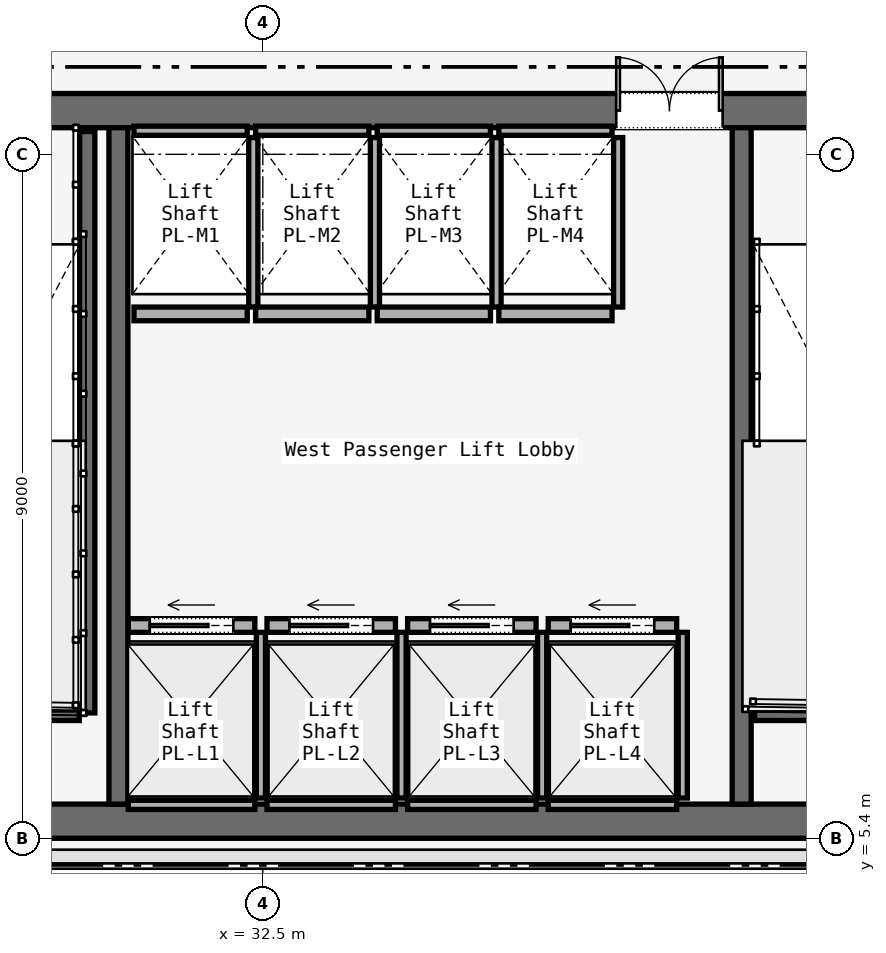
"""IFC4 building model, lengths in metres.
Left out: names, types, materials, properties, quantities, classifications, styles, units other than length and angle.
Written with IfcOpenShell. Run it as: python <this file> out.ifc"""

import sys

from ifc_helpers import new_model, si_unit, direction, frame, frame_2d, origin, place, context, subcontext, project, spatial, rectangle, extrude, element, fill, save


model = new_model("IFC4")
c1 = context("Model", 3, precision=1e-05, world=origin(), true_north=direction((0.0, 1.0)))
c2 = subcontext(c1, "Body", "Model", "MODEL_VIEW")
j1 = project(units=[si_unit("LENGTHUNIT", "METRE"), si_unit("PLANEANGLEUNIT", "RADIAN")], contexts=[c1])
p1 = place(None, origin())
s1 = spatial("IfcSite", under=j1, at=p1, CompositionType="ELEMENT")
p2 = place(p1, origin())
s2 = spatial("IfcBuilding", under=s1, at=p2, CompositionType="ELEMENT")
p3 = place(p2, frame((0.0, 0.0, 58.8)))
s3 = spatial("IfcBuildingStorey", under=s2, at=p3, CompositionType="ELEMENT", Elevation=58.8)
p4 = place(p3, frame((26.45, 14.975, 0.0), z_axis=(0.0, 0.0, 1.0), x_axis=(1.0, 0.0, 0.0)))
e1 = element("IfcWall", 1, at=p4, inside=s3, PredefinedType="SOLIDWALL", context=c2, shape_type="SweptSolid", body=[
    extrude(rectangle(XDim=31.1, YDim=0.45, at=frame_2d((15.55, 0.0))), origin(), (0.0, 0.0, 1.0), 3.58),
])
p5 = place(p4, frame((1.65, 0.0, 0.0)))
e2 = element("IfcOpeningElement", 2, at=p5, cuts=e1, PredefinedType="OPENING", context=c2, shape_type="SweptSolid", body=[
    extrude(rectangle(XDim=1.1, YDim=2.2, at=frame_2d((0.55, 1.1))), frame((0.0, 0.225, 0.0), z_axis=(0.0, -1.0, 0.0), x_axis=(1.0, 0.0, 0.0)), (0.0, 0.0, 1.0), 0.45),
])
p6 = place(p4, frame((13.65, 0.0, 0.0)))
e3 = element("IfcOpeningElement", 3, at=p6, cuts=e1, PredefinedType="OPENING", context=c2, shape_type="SweptSolid", body=[
    extrude(rectangle(XDim=1.1, YDim=2.2, at=frame_2d((0.55, 1.1))), frame((0.0, 0.225, 0.0), z_axis=(0.0, -1.0, 0.0), x_axis=(1.0, 0.0, 0.0)), (0.0, 0.0, 1.0), 0.45),
])
p7 = place(p4, frame((25.55, 0.0, 0.0)))
e4 = element("IfcOpeningElement", 4, at=p7, cuts=e1, PredefinedType="OPENING", context=c2, shape_type="SweptSolid", body=[
    extrude(rectangle(XDim=1.1, YDim=2.2, at=frame_2d((0.55, 1.1))), frame((0.0, 0.225, 0.0), z_axis=(0.0, -1.0, 0.0), x_axis=(1.0, 0.0, 0.0)), (0.0, 0.0, 1.0), 0.45),
])
p8 = place(p4, frame((10.7, 0.0, 0.0)))
e5 = element("IfcOpeningElement", 5, at=p8, cuts=e1, PredefinedType="OPENING", context=c2, shape_type="SweptSolid", body=[
    extrude(rectangle(XDim=1.4, YDim=2.2, at=frame_2d((0.7, 1.1))), frame((0.0, 0.225, 0.0), z_axis=(0.0, -1.0, 0.0), x_axis=(1.0, 0.0, 0.0)), (0.0, 0.0, 1.0), 0.45),
])
p9 = place(p4, frame((19.35, 0.0, 0.0)))
e6 = element("IfcOpeningElement", 6, at=p9, cuts=e1, PredefinedType="OPENING", context=c2, shape_type="SweptSolid", body=[
    extrude(rectangle(XDim=1.1, YDim=2.2, at=frame_2d((0.55, 1.1))), frame((0.0, 0.225, 0.0), z_axis=(0.0, -1.0, 0.0), x_axis=(1.0, 0.0, 0.0)), (0.0, 0.0, 1.0), 0.45),
])
p10 = place(p4, frame((21.4, 0.0, 0.0)))
e7 = element("IfcOpeningElement", 7, at=p10, cuts=e1, PredefinedType="OPENING", context=c2, shape_type="SweptSolid", body=[
    extrude(rectangle(XDim=0.9, YDim=2.1, at=frame_2d((0.45, 1.05))), frame((0.0, 0.225, 0.0), z_axis=(0.0, -1.0, 0.0), x_axis=(1.0, 0.0, 0.0)), (0.0, 0.0, 1.0), 0.45),
])
p11 = place(p4, frame((23.35, 0.0, 0.0)))
e8 = element("IfcOpeningElement", 8, at=p11, cuts=e1, PredefinedType="OPENING", context=c2, shape_type="SweptSolid", body=[
    extrude(rectangle(XDim=1.3, YDim=2.3, at=frame_2d((0.65, 1.15))), frame((0.0, 0.225, 0.0), z_axis=(0.0, -1.0, 0.0), x_axis=(1.0, 0.0, 0.0)), (0.0, 0.0, 1.0), 0.45),
])
p12 = place(p3, frame((26.45, 5.625, 0.0), z_axis=(0.0, 0.0, 1.0), x_axis=(1.0, 0.0, 0.0)))
e9 = element("IfcWall", 9, at=p12, inside=s3, PredefinedType="SOLIDWALL", context=c2, shape_type="SweptSolid", body=[
    extrude(rectangle(XDim=31.1, YDim=0.45, at=frame_2d((15.55, 0.0))), origin(), (0.0, 0.0, 1.0), 3.58),
])
for number, where, z_axis, x_axis in (
    (10, (30.6, 5.85, 0.0), (0.0, 0.0, 1.0), (0.0, 1.0, 0.0)),
    (11, (38.8, 5.85, 0.0), (0.0, 0.0, 1.0), (0.0, 1.0, 0.0)),
):
    element("IfcWall", number, at=place(p3, frame(where, z_axis=z_axis, x_axis=x_axis)), inside=s3, PredefinedType="SOLIDWALL", context=c2, shape_type="SweptSolid", body=[
        extrude(rectangle(XDim=8.9, YDim=0.25, at=frame_2d((4.45, 0.0))), origin(), (0.0, 0.0, 1.0), 3.58),
    ])
p13 = place(p3, frame((30.19, 14.7, 0.0), z_axis=(0.0, 0.0, 1.0), x_axis=(0.0, -1.0, 0.0)))
e12 = element("IfcWall", 12, at=p13, inside=s3, PredefinedType="SOLIDWALL", context=c2, shape_type="SweptSolid", body=[
    extrude(rectangle(XDim=7.65, YDim=0.2, at=frame_2d((3.825, 0.0))), origin(), (0.0, 0.0, 1.0), 3.8),
])
for number, where, z_axis, x_axis in (
    (13, (26.97, 7.05, 0.0), (0.0, 0.0, 1.0), (1.0, 0.0, 0.0)),
    (14, (38.97, 7.05, 0.0), (0.0, 0.0, 1.0), (1.0, 0.0, 0.0)),
):
    element("IfcWall", number, at=place(p3, frame(where, z_axis=z_axis, x_axis=x_axis)), inside=s3, PredefinedType="SOLIDWALL", context=c2, shape_type="SweptSolid", body=[
        extrude(rectangle(XDim=3.115, YDim=0.2, at=frame_2d((1.558, 0.0))), origin(), (0.0, 0.0, 1.0), 3.8),
    ])
p14 = place(p3, frame((30.73, 8.2, 0.0), z_axis=(0.0, 0.0, 1.0), x_axis=(1.0, 0.0, 0.0)))
e15 = element("IfcWall", 15, at=p14, inside=s3, PredefinedType="SOLIDWALL", context=c2, shape_type="SweptSolid", body=[
    extrude(rectangle(XDim=1.665, YDim=0.18, at=frame_2d((0.833, 0.0))), origin(), (0.0, 0.0, 1.0), 2.933),
])
p15 = place(p14, frame((0.282, 0.0, 0.0)))
e16 = element("IfcOpeningElement", 16, at=p15, cuts=e15, PredefinedType="OPENING", context=c2, shape_type="SweptSolid", body=[
    extrude(rectangle(XDim=1.1, YDim=2.2, at=frame_2d((0.55, 1.1))), frame((0.0, 0.09, 0.0), z_axis=(0.0, -1.0, 0.0), x_axis=(1.0, 0.0, 0.0)), (0.0, 0.0, 1.0), 0.18),
])
p16 = place(p3, frame((30.73, 5.84, 0.0), z_axis=(0.0, 0.0, 1.0), x_axis=(1.0, 0.0, 0.0)))
e17 = element("IfcWall", 17, at=p16, inside=s3, PredefinedType="SOLIDWALL", context=c2, shape_type="SweptSolid", body=[
    extrude(rectangle(XDim=1.665, YDim=0.12, at=frame_2d((0.833, 0.0))), origin(), (0.0, 0.0, 1.0), 2.933),
])
p17 = place(p3, frame((32.475, 5.93, 0.0), z_axis=(0.0, 0.0, 1.0), x_axis=(0.0, 1.0, 0.0)))
e18 = element("IfcWall", 18, at=p17, inside=s3, PredefinedType="SOLIDWALL", context=c2, shape_type="SweptSolid", body=[
    extrude(rectangle(XDim=2.18, YDim=0.12, at=frame_2d((1.09, 0.0))), origin(), (0.0, 0.0, 1.0), 2.933),
])
p18 = place(p3, frame((32.555, 8.2, 0.0), z_axis=(0.0, 0.0, 1.0), x_axis=(1.0, 0.0, 0.0)))
e19 = element("IfcWall", 19, at=p18, inside=s3, PredefinedType="SOLIDWALL", context=c2, shape_type="SweptSolid", body=[
    extrude(rectangle(XDim=1.69, YDim=0.18, at=frame_2d((0.845, 0.0))), origin(), (0.0, 0.0, 1.0), 2.933),
])
p19 = place(p18, frame((0.295, 0.0, 0.0)))
e20 = element("IfcOpeningElement", 20, at=p19, cuts=e19, PredefinedType="OPENING", context=c2, shape_type="SweptSolid", body=[
    extrude(rectangle(XDim=1.1, YDim=2.2, at=frame_2d((0.55, 1.1))), frame((0.0, 0.09, 0.0), z_axis=(0.0, -1.0, 0.0), x_axis=(1.0, 0.0, 0.0)), (0.0, 0.0, 1.0), 0.18),
])
p20 = place(p3, frame((32.555, 5.84, 0.0), z_axis=(0.0, 0.0, 1.0), x_axis=(1.0, 0.0, 0.0)))
e21 = element("IfcWall", 21, at=p20, inside=s3, PredefinedType="SOLIDWALL", context=c2, shape_type="SweptSolid", body=[
    extrude(rectangle(XDim=1.69, YDim=0.12, at=frame_2d((0.845, 0.0))), origin(), (0.0, 0.0, 1.0), 2.933),
])
p21 = place(p3, frame((34.325, 5.93, 0.0), z_axis=(0.0, 0.0, 1.0), x_axis=(0.0, 1.0, 0.0)))
e22 = element("IfcWall", 22, at=p21, inside=s3, PredefinedType="SOLIDWALL", context=c2, shape_type="SweptSolid", body=[
    extrude(rectangle(XDim=2.18, YDim=0.12, at=frame_2d((1.09, 0.0))), origin(), (0.0, 0.0, 1.0), 2.933),
])
p22 = place(p3, frame((34.405, 8.2, 0.0), z_axis=(0.0, 0.0, 1.0), x_axis=(1.0, 0.0, 0.0)))
e23 = element("IfcWall", 23, at=p22, inside=s3, PredefinedType="SOLIDWALL", context=c2, shape_type="SweptSolid", body=[
    extrude(rectangle(XDim=1.69, YDim=0.18, at=frame_2d((0.845, 0.0))), origin(), (0.0, 0.0, 1.0), 2.933),
])
p23 = place(p22, frame((0.295, 0.0, 0.0)))
e24 = element("IfcOpeningElement", 24, at=p23, cuts=e23, PredefinedType="OPENING", context=c2, shape_type="SweptSolid", body=[
    extrude(rectangle(XDim=1.1, YDim=2.2, at=frame_2d((0.55, 1.1))), frame((0.0, 0.09, 0.0), z_axis=(0.0, -1.0, 0.0), x_axis=(1.0, 0.0, 0.0)), (0.0, 0.0, 1.0), 0.18),
])
p24 = place(p3, frame((34.405, 5.84, 0.0), z_axis=(0.0, 0.0, 1.0), x_axis=(1.0, 0.0, 0.0)))
e25 = element("IfcWall", 25, at=p24, inside=s3, PredefinedType="SOLIDWALL", context=c2, shape_type="SweptSolid", body=[
    extrude(rectangle(XDim=1.69, YDim=0.12, at=frame_2d((0.845, 0.0))), origin(), (0.0, 0.0, 1.0), 2.933),
])
p25 = place(p3, frame((36.175, 5.93, 0.0), z_axis=(0.0, 0.0, 1.0), x_axis=(0.0, 1.0, 0.0)))
e26 = element("IfcWall", 26, at=p25, inside=s3, PredefinedType="SOLIDWALL", context=c2, shape_type="SweptSolid", body=[
    extrude(rectangle(XDim=2.18, YDim=0.12, at=frame_2d((1.09, 0.0))), origin(), (0.0, 0.0, 1.0), 2.933),
])
p26 = place(p3, frame((36.255, 8.2, 0.0), z_axis=(0.0, 0.0, 1.0), x_axis=(1.0, 0.0, 0.0)))
e27 = element("IfcWall", 27, at=p26, inside=s3, PredefinedType="SOLIDWALL", context=c2, shape_type="SweptSolid", body=[
    extrude(rectangle(XDim=1.69, YDim=0.18, at=frame_2d((0.845, 0.0))), origin(), (0.0, 0.0, 1.0), 2.933),
])
p27 = place(p26, frame((0.295, 0.0, 0.0)))
e28 = element("IfcOpeningElement", 28, at=p27, cuts=e27, PredefinedType="OPENING", context=c2, shape_type="SweptSolid", body=[
    extrude(rectangle(XDim=1.1, YDim=2.2, at=frame_2d((0.55, 1.1))), frame((0.0, 0.09, 0.0), z_axis=(0.0, -1.0, 0.0), x_axis=(1.0, 0.0, 0.0)), (0.0, 0.0, 1.0), 0.18),
])
p28 = place(p3, frame((36.255, 5.84, 0.0), z_axis=(0.0, 0.0, 1.0), x_axis=(1.0, 0.0, 0.0)))
e29 = element("IfcWall", 29, at=p28, inside=s3, PredefinedType="SOLIDWALL", context=c2, shape_type="SweptSolid", body=[
    extrude(rectangle(XDim=1.69, YDim=0.12, at=frame_2d((0.845, 0.0))), origin(), (0.0, 0.0, 1.0), 2.933),
])
p29 = place(p3, frame((38.025, 5.93, 0.0), z_axis=(0.0, 0.0, 1.0), x_axis=(0.0, 1.0, 0.0)))
e30 = element("IfcWall", 30, at=p29, inside=s3, PredefinedType="SOLIDWALL", context=c2, shape_type="SweptSolid", body=[
    extrude(rectangle(XDim=2.18, YDim=0.12, at=frame_2d((1.09, 0.0))), origin(), (0.0, 0.0, 1.0), 2.933),
])
p30 = place(p3, frame((30.805, 12.3, 0.0), z_axis=(0.0, 0.0, 1.0), x_axis=(1.0, 0.0, 0.0)))
e31 = element("IfcWall", 31, at=p30, inside=s3, PredefinedType="SOLIDWALL", context=c2, shape_type="SweptSolid", body=[
    extrude(rectangle(XDim=1.49, YDim=0.18, at=frame_2d((0.745, 0.0))), origin(), (0.0, 0.0, 1.0), 2.933),
])
p31 = place(p3, frame((30.805, 14.71, 0.0), z_axis=(0.0, 0.0, 1.0), x_axis=(1.0, 0.0, 0.0)))
e32 = element("IfcWall", 32, at=p31, inside=s3, PredefinedType="SOLIDWALL", context=c2, shape_type="SweptSolid", body=[
    extrude(rectangle(XDim=1.49, YDim=0.12, at=frame_2d((0.745, 0.0))), origin(), (0.0, 0.0, 1.0), 2.933),
])
p32 = place(p3, frame((32.375, 12.39, 0.0), z_axis=(0.0, 0.0, 1.0), x_axis=(0.0, 1.0, 0.0)))
e33 = element("IfcWall", 33, at=p32, inside=s3, PredefinedType="SOLIDWALL", context=c2, shape_type="SweptSolid", body=[
    extrude(rectangle(XDim=2.23, YDim=0.12, at=frame_2d((1.115, 0.0))), origin(), (0.0, 0.0, 1.0), 2.933),
])
p33 = place(p3, frame((32.405, 12.3, 0.0), z_axis=(0.0, 0.0, 1.0), x_axis=(1.0, 0.0, 0.0)))
e34 = element("IfcWall", 34, at=p33, inside=s3, PredefinedType="SOLIDWALL", context=c2, shape_type="SweptSolid", body=[
    extrude(rectangle(XDim=1.49, YDim=0.18, at=frame_2d((0.745, 0.0))), origin(), (0.0, 0.0, 1.0), 2.933),
])
p34 = place(p3, frame((32.405, 14.71, 0.0), z_axis=(0.0, 0.0, 1.0), x_axis=(1.0, 0.0, 0.0)))
e35 = element("IfcWall", 35, at=p34, inside=s3, PredefinedType="SOLIDWALL", context=c2, shape_type="SweptSolid", body=[
    extrude(rectangle(XDim=1.49, YDim=0.12, at=frame_2d((0.745, 0.0))), origin(), (0.0, 0.0, 1.0), 2.933),
])
p35 = place(p3, frame((33.975, 12.39, 0.0), z_axis=(0.0, 0.0, 1.0), x_axis=(0.0, 1.0, 0.0)))
e36 = element("IfcWall", 36, at=p35, inside=s3, PredefinedType="SOLIDWALL", context=c2, shape_type="SweptSolid", body=[
    extrude(rectangle(XDim=2.23, YDim=0.12, at=frame_2d((1.115, 0.0))), origin(), (0.0, 0.0, 1.0), 2.933),
])
p36 = place(p3, frame((34.005, 12.3, 0.0), z_axis=(0.0, 0.0, 1.0), x_axis=(1.0, 0.0, 0.0)))
e37 = element("IfcWall", 37, at=p36, inside=s3, PredefinedType="SOLIDWALL", context=c2, shape_type="SweptSolid", body=[
    extrude(rectangle(XDim=1.49, YDim=0.18, at=frame_2d((0.745, 0.0))), origin(), (0.0, 0.0, 1.0), 2.933),
])
p37 = place(p3, frame((34.005, 14.71, 0.0), z_axis=(0.0, 0.0, 1.0), x_axis=(1.0, 0.0, 0.0)))
e38 = element("IfcWall", 38, at=p37, inside=s3, PredefinedType="SOLIDWALL", context=c2, shape_type="SweptSolid", body=[
    extrude(rectangle(XDim=1.49, YDim=0.12, at=frame_2d((0.745, 0.0))), origin(), (0.0, 0.0, 1.0), 2.933),
])
p38 = place(p3, frame((35.575, 12.39, 0.0), z_axis=(0.0, 0.0, 1.0), x_axis=(0.0, 1.0, 0.0)))
e39 = element("IfcWall", 39, at=p38, inside=s3, PredefinedType="SOLIDWALL", context=c2, shape_type="SweptSolid", body=[
    extrude(rectangle(XDim=2.23, YDim=0.12, at=frame_2d((1.115, 0.0))), origin(), (0.0, 0.0, 1.0), 2.933),
])
p39 = place(p3, frame((35.605, 12.3, 0.0), z_axis=(0.0, 0.0, 1.0), x_axis=(1.0, 0.0, 0.0)))
e40 = element("IfcWall", 40, at=p39, inside=s3, PredefinedType="SOLIDWALL", context=c2, shape_type="SweptSolid", body=[
    extrude(rectangle(XDim=1.49, YDim=0.18, at=frame_2d((0.745, 0.0))), origin(), (0.0, 0.0, 1.0), 2.933),
])
p40 = place(p3, frame((35.605, 14.71, 0.0), z_axis=(0.0, 0.0, 1.0), x_axis=(1.0, 0.0, 0.0)))
e41 = element("IfcWall", 41, at=p40, inside=s3, PredefinedType="SOLIDWALL", context=c2, shape_type="SweptSolid", body=[
    extrude(rectangle(XDim=1.49, YDim=0.12, at=frame_2d((0.745, 0.0))), origin(), (0.0, 0.0, 1.0), 2.933),
])
p41 = place(p3, frame((37.175, 12.39, 0.0), z_axis=(0.0, 0.0, 1.0), x_axis=(0.0, 1.0, 0.0)))
e42 = element("IfcWall", 42, at=p41, inside=s3, PredefinedType="SOLIDWALL", context=c2, shape_type="SweptSolid", body=[
    extrude(rectangle(XDim=2.23, YDim=0.12, at=frame_2d((1.115, 0.0))), origin(), (0.0, 0.0, 1.0), 2.933),
])
p42 = place(p8, origin())
e43 = element("IfcDoor", 43, at=p42, inside=s3, OperationType="DOUBLE_DOOR_SINGLE_SWING", PredefinedType="DOOR", context=c2, shape_type="SweptSolid", body=[
    extrude(rectangle(XDim=1.4, YDim=2.2, at=frame_2d((0.7, 1.1))), frame((0.0, 0.025, 0.0), z_axis=(0.0, -1.0, 0.0), x_axis=(1.0, 0.0, 0.0)), (0.0, 0.0, 1.0), 0.05),
])
fill(e5, e43)
p43 = place(p15, origin())
e44 = element("IfcDoor", 44, at=p43, inside=s3, OperationType="SLIDING_TO_LEFT", PredefinedType="DOOR", context=c2, shape_type="SweptSolid", body=[
    extrude(rectangle(XDim=1.1, YDim=2.2, at=frame_2d((0.55, 1.1))), frame((0.0, 0.025, 0.0), z_axis=(0.0, -1.0, 0.0), x_axis=(1.0, 0.0, 0.0)), (0.0, 0.0, 1.0), 0.05),
])
fill(e16, e44)
p44 = place(p19, origin())
e45 = element("IfcDoor", 45, at=p44, inside=s3, OperationType="SLIDING_TO_LEFT", PredefinedType="DOOR", context=c2, shape_type="SweptSolid", body=[
    extrude(rectangle(XDim=1.1, YDim=2.2, at=frame_2d((0.55, 1.1))), frame((0.0, 0.025, 0.0), z_axis=(0.0, -1.0, 0.0), x_axis=(1.0, 0.0, 0.0)), (0.0, 0.0, 1.0), 0.05),
])
fill(e20, e45)
p45 = place(p23, origin())
e46 = element("IfcDoor", 46, at=p45, inside=s3, OperationType="SLIDING_TO_LEFT", PredefinedType="DOOR", context=c2, shape_type="SweptSolid", body=[
    extrude(rectangle(XDim=1.1, YDim=2.2, at=frame_2d((0.55, 1.1))), frame((0.0, 0.025, 0.0), z_axis=(0.0, -1.0, 0.0), x_axis=(1.0, 0.0, 0.0)), (0.0, 0.0, 1.0), 0.05),
])
fill(e24, e46)
p46 = place(p27, origin())
e47 = element("IfcDoor", 47, at=p46, inside=s3, OperationType="SLIDING_TO_LEFT", PredefinedType="DOOR", context=c2, shape_type="SweptSolid", body=[
    extrude(rectangle(XDim=1.1, YDim=2.2, at=frame_2d((0.55, 1.1))), frame((0.0, 0.025, 0.0), z_axis=(0.0, -1.0, 0.0), x_axis=(1.0, 0.0, 0.0)), (0.0, 0.0, 1.0), 0.05),
])
fill(e28, e47)
save(model, sys.argv[1])
